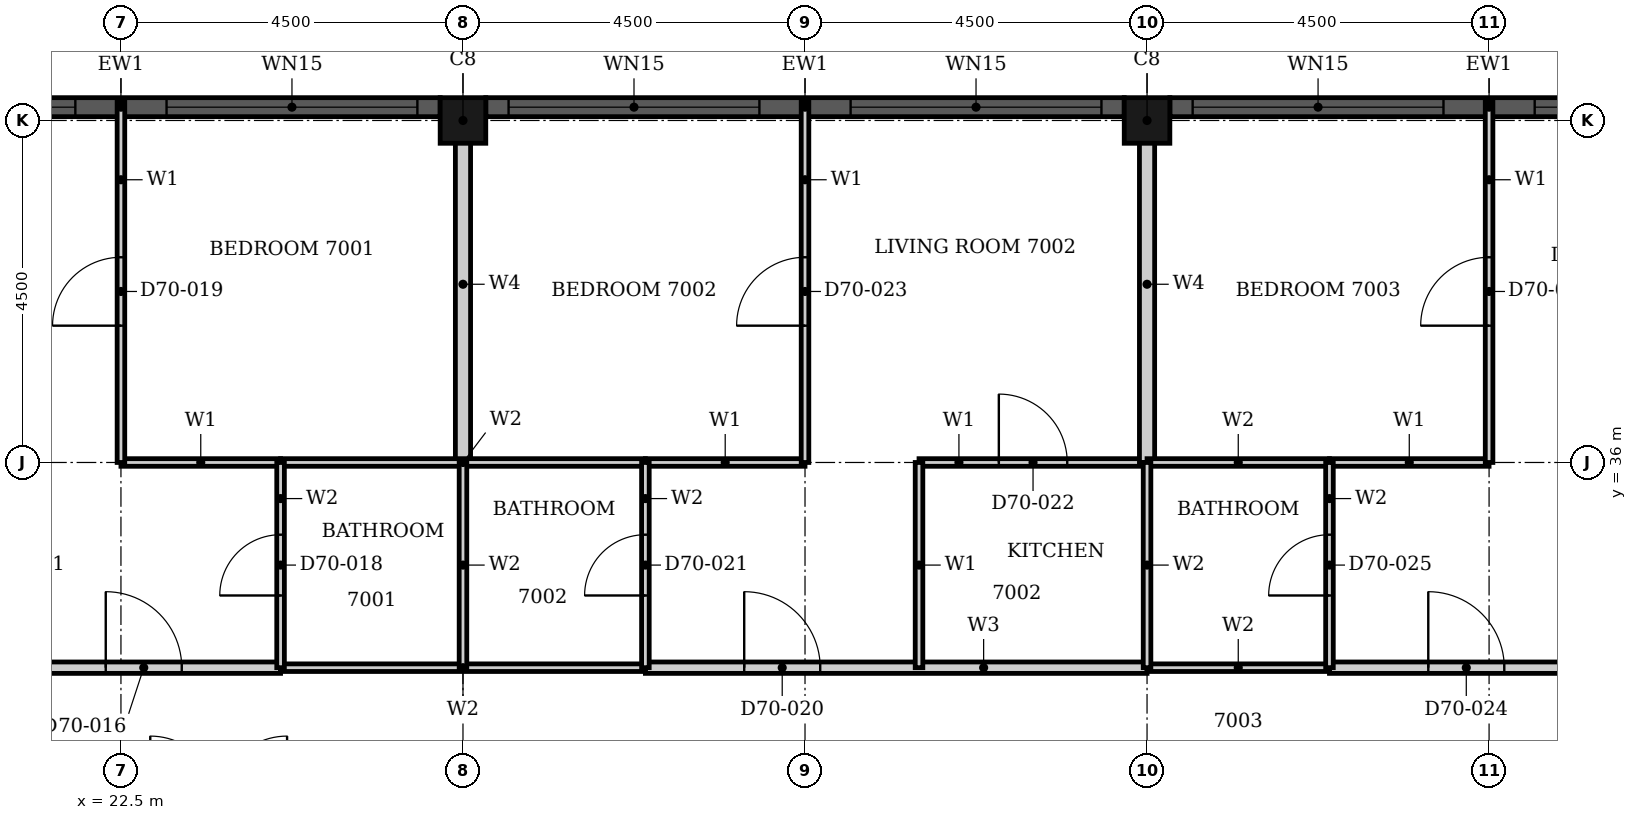
"""IFC4 building model, lengths in metres.
Left out: names, types, materials, properties, quantities, classifications, styles, units other than length and angle.
Written with IfcOpenShell. Run it as: python <this file> out.ifc"""

import sys

from ifc_helpers import new_model, si_unit, direction, frame, frame_2d, origin, origin_2d, place, context, subcontext, project, spatial, rectangle, hollow_rectangle, extrude, element, fill, save


model = new_model("IFC4")
c1 = context("Model", 3, precision=1e-05, world=origin(), true_north=direction((0.0, 1.0)))
c2 = subcontext(c1, "Body", "Model", "MODEL_VIEW")
j1 = project(units=[si_unit("LENGTHUNIT", "METRE"), si_unit("PLANEANGLEUNIT", "RADIAN")], contexts=[c1])
p1 = place(None, origin())
s1 = spatial("IfcSite", under=j1, at=p1, CompositionType="ELEMENT")
p2 = place(p1, origin())
s2 = spatial("IfcBuilding", under=s1, at=p2, CompositionType="ELEMENT")
p3 = place(p2, frame((0.0, 0.0, 274.9)))
s3 = spatial("IfcBuildingStorey", under=s2, at=p3, CompositionType="ELEMENT", Elevation=274.9)
for number, where, z_axis, x_axis in (
    (1, (36.0, 40.5, 0.0), (0.0, 0.0, 1.0), (1.0, 0.0, 0.0)),
    (2, (27.0, 40.5, 0.0), (0.0, 0.0, 1.0), (1.0, 0.0, 0.0)),
):
    element("IfcColumn", number, at=place(p3, frame(where, z_axis=z_axis, x_axis=x_axis)), inside=s3, PredefinedType="COLUMN", context=c2, shape_type="SweptSolid", body=[
        extrude(hollow_rectangle(XDim=0.6, YDim=0.6, WallThickness=0.02, at=origin_2d()), origin(), (0.0, 0.0, 1.0), 3.7),
    ])
p4 = place(p3, frame((44.7, 40.675, 0.0), z_axis=(0.0, 0.0, 1.0), x_axis=(-1.0, 0.0, 0.0)))
e3 = element("IfcWall", 3, at=p4, inside=s3, PredefinedType="SOLIDWALL", context=c2, shape_type="SweptSolid", body=[
    extrude(rectangle(XDim=8.4, YDim=0.25, at=frame_2d((4.2, 0.0))), origin(), (0.0, 0.0, 1.0), 3.7),
])
p5 = place(p4, frame((0.3, 0.0, 0.45)))
e4 = element("IfcOpeningElement", 4, at=p5, cuts=e3, PredefinedType="OPENING", context=c2, shape_type="SweptSolid", body=[
    extrude(rectangle(XDim=3.3, YDim=2.3, at=frame_2d((1.65, 1.15))), frame((0.0, 0.135, 0.0), z_axis=(0.0, -1.0, 0.0), x_axis=(1.0, 0.0, 0.0)), (0.0, 0.0, 1.0), 0.27),
])
p6 = place(p4, frame((4.8, 0.0, 0.45)))
e5 = element("IfcOpeningElement", 5, at=p6, cuts=e3, PredefinedType="OPENING", context=c2, shape_type="SweptSolid", body=[
    extrude(rectangle(XDim=3.3, YDim=2.3, at=frame_2d((1.65, 1.15))), frame((0.0, 0.135, 0.0), z_axis=(0.0, -1.0, 0.0), x_axis=(1.0, 0.0, 0.0)), (0.0, 0.0, 1.0), 0.27),
])
p7 = place(p3, frame((35.7, 40.675, 0.0), z_axis=(0.0, 0.0, 1.0), x_axis=(-1.0, 0.0, 0.0)))
e6 = element("IfcWall", 6, at=p7, inside=s3, PredefinedType="SOLIDWALL", context=c2, shape_type="SweptSolid", body=[
    extrude(rectangle(XDim=8.4, YDim=0.25, at=frame_2d((4.2, 0.0))), origin(), (0.0, 0.0, 1.0), 3.7),
])
p8 = place(p7, frame((0.3, 0.0, 0.45)))
e7 = element("IfcOpeningElement", 7, at=p8, cuts=e6, PredefinedType="OPENING", context=c2, shape_type="SweptSolid", body=[
    extrude(rectangle(XDim=3.3, YDim=2.3, at=frame_2d((1.65, 1.15))), frame((0.0, 0.135, 0.0), z_axis=(0.0, -1.0, 0.0), x_axis=(1.0, 0.0, 0.0)), (0.0, 0.0, 1.0), 0.27),
])
p9 = place(p7, frame((4.8, 0.0, 0.45)))
e8 = element("IfcOpeningElement", 8, at=p9, cuts=e6, PredefinedType="OPENING", context=c2, shape_type="SweptSolid", body=[
    extrude(rectangle(XDim=3.3, YDim=2.3, at=frame_2d((1.65, 1.15))), frame((0.0, 0.135, 0.0), z_axis=(0.0, -1.0, 0.0), x_axis=(1.0, 0.0, 0.0)), (0.0, 0.0, 1.0), 0.27),
])
p10 = place(p3, frame((26.7, 40.675, 0.0), z_axis=(0.0, 0.0, 1.0), x_axis=(-1.0, 0.0, 0.0)))
e9 = element("IfcWall", 9, at=p10, inside=s3, PredefinedType="SOLIDWALL", context=c2, shape_type="SweptSolid", body=[
    extrude(rectangle(XDim=8.4, YDim=0.25, at=frame_2d((4.2, 0.0))), origin(), (0.0, 0.0, 1.0), 3.7),
])
p11 = place(p10, frame((0.3, 0.0, 0.45)))
e10 = element("IfcOpeningElement", 10, at=p11, cuts=e9, PredefinedType="OPENING", context=c2, shape_type="SweptSolid", body=[
    extrude(rectangle(XDim=3.3, YDim=2.3, at=frame_2d((1.65, 1.15))), frame((0.0, 0.135, 0.0), z_axis=(0.0, -1.0, 0.0), x_axis=(1.0, 0.0, 0.0)), (0.0, 0.0, 1.0), 0.27),
])
p12 = place(p10, frame((4.8, 0.0, 0.45)))
e11 = element("IfcOpeningElement", 11, at=p12, cuts=e9, PredefinedType="OPENING", context=c2, shape_type="SweptSolid", body=[
    extrude(rectangle(XDim=3.3, YDim=2.3, at=frame_2d((1.65, 1.15))), frame((0.0, 0.135, 0.0), z_axis=(0.0, -1.0, 0.0), x_axis=(1.0, 0.0, 0.0)), (0.0, 0.0, 1.0), 0.27),
])
p13 = place(p3, frame((18.0, 33.3, 0.0), z_axis=(0.0, 0.0, 1.0), x_axis=(1.0, 0.0, 0.0)))
e12 = element("IfcWall", 12, at=p13, inside=s3, PredefinedType="PARTITIONING", context=c2, shape_type="SweptSolid", body=[
    extrude(rectangle(XDim=6.6, YDim=0.15, at=frame_2d((3.3, 0.0))), origin(), (0.0, 0.0, 1.0), 3.3),
])
p14 = place(p13, frame((4.3, 0.0, 0.0)))
e13 = element("IfcOpeningElement", 13, at=p14, cuts=e12, PredefinedType="OPENING", context=c2, shape_type="SweptSolid", body=[
    extrude(rectangle(XDim=1.0, YDim=2.2, at=frame_2d((0.5, 1.1))), frame((0.0, 0.085, 0.0), z_axis=(0.0, -1.0, 0.0), x_axis=(1.0, 0.0, 0.0)), (0.0, 0.0, 1.0), 0.17),
])
p15 = place(p3, frame((29.4, 33.3, 0.0), z_axis=(0.0, 0.0, 1.0), x_axis=(1.0, 0.0, 0.0)))
e14 = element("IfcWall", 14, at=p15, inside=s3, PredefinedType="PARTITIONING", context=c2, shape_type="SweptSolid", body=[
    extrude(rectangle(XDim=6.6, YDim=0.15, at=frame_2d((3.3, 0.0))), origin(), (0.0, 0.0, 1.0), 3.3),
])
p16 = place(p15, frame((1.3, 0.0, 0.0)))
e15 = element("IfcOpeningElement", 15, at=p16, cuts=e14, PredefinedType="OPENING", context=c2, shape_type="SweptSolid", body=[
    extrude(rectangle(XDim=1.0, YDim=2.2, at=frame_2d((0.5, 1.1))), frame((0.0, 0.085, 0.0), z_axis=(0.0, -1.0, 0.0), x_axis=(1.0, 0.0, 0.0)), (0.0, 0.0, 1.0), 0.17),
])
p17 = place(p3, frame((38.4, 33.3, 0.0), z_axis=(0.0, 0.0, 1.0), x_axis=(1.0, 0.0, 0.0)))
e16 = element("IfcWall", 16, at=p17, inside=s3, PredefinedType="PARTITIONING", context=c2, shape_type="SweptSolid", body=[
    extrude(rectangle(XDim=6.6, YDim=0.15, at=frame_2d((3.3, 0.0))), origin(), (0.0, 0.0, 1.0), 3.3),
])
p18 = place(p17, frame((1.3, 0.0, 0.0)))
e17 = element("IfcOpeningElement", 17, at=p18, cuts=e16, PredefinedType="OPENING", context=c2, shape_type="SweptSolid", body=[
    extrude(rectangle(XDim=1.0, YDim=2.2, at=frame_2d((0.5, 1.1))), frame((0.0, 0.085, 0.0), z_axis=(0.0, -1.0, 0.0), x_axis=(1.0, 0.0, 0.0)), (0.0, 0.0, 1.0), 0.17),
])
for number, where, z_axis, x_axis in (
    (18, (22.5, 36.0, 0.0), (0.0, 0.0, 1.0), (1.0, 0.0, 0.0)),
    (19, (29.4, 36.0, 0.0), (0.0, 0.0, 1.0), (1.0, 0.0, 0.0)),
):
    element("IfcWall", number, at=place(p3, frame(where, z_axis=z_axis, x_axis=x_axis)), inside=s3, PredefinedType="PARTITIONING", context=c2, shape_type="SweptSolid", body=[
        extrude(rectangle(XDim=2.1, YDim=0.1, at=frame_2d((1.05, 0.0))), origin(), (0.0, 0.0, 1.0), 3.3),
    ])
p19 = place(p3, frame((33.0, 36.0, 0.0), z_axis=(0.0, 0.0, 1.0), x_axis=(1.0, 0.0, 0.0)))
e20 = element("IfcWall", 20, at=p19, inside=s3, PredefinedType="PARTITIONING", context=c2, shape_type="SweptSolid", body=[
    extrude(rectangle(XDim=3.0, YDim=0.1, at=frame_2d((1.5, 0.0))), origin(), (0.0, 0.0, 1.0), 3.3),
])
p20 = place(p19, frame((1.05, 0.0, 0.0)))
e21 = element("IfcOpeningElement", 21, at=p20, cuts=e20, PredefinedType="OPENING", context=c2, shape_type="SweptSolid", body=[
    extrude(rectangle(XDim=0.9, YDim=2.1, at=frame_2d((0.45, 1.05))), frame((0.0, 0.06, 0.0), z_axis=(0.0, -1.0, 0.0), x_axis=(1.0, 0.0, 0.0)), (0.0, 0.0, 1.0), 0.12),
])
p21 = place(p3, frame((38.4, 36.0, 0.0), z_axis=(0.0, 0.0, 1.0), x_axis=(1.0, 0.0, 0.0)))
e22 = element("IfcWall", 22, at=p21, inside=s3, PredefinedType="PARTITIONING", context=c2, shape_type="SweptSolid", body=[
    extrude(rectangle(XDim=2.1, YDim=0.1, at=frame_2d((1.05, 0.0))), origin(), (0.0, 0.0, 1.0), 3.3),
])
p22 = place(p3, frame((22.5, 36.0, 0.0), z_axis=(0.0, 0.0, 1.0), x_axis=(0.0, 1.0, 0.0)))
e23 = element("IfcWall", 23, at=p22, inside=s3, PredefinedType="PARTITIONING", context=c2, shape_type="SweptSolid", body=[
    extrude(rectangle(XDim=4.74, YDim=0.1, at=frame_2d((2.37, 0.0))), origin(), (0.0, 0.0, 1.0), 3.3),
])
p23 = place(p22, frame((1.8, 0.0, 0.0)))
e24 = element("IfcOpeningElement", 24, at=p23, cuts=e23, PredefinedType="OPENING", context=c2, shape_type="SweptSolid", body=[
    extrude(rectangle(XDim=0.9, YDim=2.1, at=frame_2d((0.45, 1.05))), frame((0.0, 0.06, 0.0), z_axis=(0.0, -1.0, 0.0), x_axis=(1.0, 0.0, 0.0)), (0.0, 0.0, 1.0), 0.12),
])
p24 = place(p3, frame((31.5, 36.0, 0.0), z_axis=(0.0, 0.0, 1.0), x_axis=(0.0, 1.0, 0.0)))
e25 = element("IfcWall", 25, at=p24, inside=s3, PredefinedType="PARTITIONING", context=c2, shape_type="SweptSolid", body=[
    extrude(rectangle(XDim=4.74, YDim=0.1, at=frame_2d((2.37, 0.0))), origin(), (0.0, 0.0, 1.0), 3.3),
])
p25 = place(p24, frame((1.8, 0.0, 0.0)))
e26 = element("IfcOpeningElement", 26, at=p25, cuts=e25, PredefinedType="OPENING", context=c2, shape_type="SweptSolid", body=[
    extrude(rectangle(XDim=0.9, YDim=2.1, at=frame_2d((0.45, 1.05))), frame((0.0, 0.06, 0.0), z_axis=(0.0, -1.0, 0.0), x_axis=(1.0, 0.0, 0.0)), (0.0, 0.0, 1.0), 0.12),
])
p26 = place(p3, frame((33.0, 33.3, 0.0), z_axis=(0.0, 0.0, 1.0), x_axis=(0.0, 1.0, 0.0)))
e27 = element("IfcWall", 27, at=p26, inside=s3, PredefinedType="PARTITIONING", context=c2, shape_type="SweptSolid", body=[
    extrude(rectangle(XDim=2.7, YDim=0.1, at=frame_2d((1.35, 0.0))), origin(), (0.0, 0.0, 1.0), 3.3),
])
p27 = place(p3, frame((40.5, 36.0, 0.0), z_axis=(0.0, 0.0, 1.0), x_axis=(0.0, 1.0, 0.0)))
e28 = element("IfcWall", 28, at=p27, inside=s3, PredefinedType="PARTITIONING", context=c2, shape_type="SweptSolid", body=[
    extrude(rectangle(XDim=4.74, YDim=0.1, at=frame_2d((2.37, 0.0))), origin(), (0.0, 0.0, 1.0), 3.3),
])
p28 = place(p27, frame((1.8, 0.0, 0.0)))
e29 = element("IfcOpeningElement", 29, at=p28, cuts=e28, PredefinedType="OPENING", context=c2, shape_type="SweptSolid", body=[
    extrude(rectangle(XDim=0.9, YDim=2.1, at=frame_2d((0.45, 1.05))), frame((0.0, 0.06, 0.0), z_axis=(0.0, -1.0, 0.0), x_axis=(1.0, 0.0, 0.0)), (0.0, 0.0, 1.0), 0.12),
])
for number, where, z_axis, x_axis in (
    (30, (27.0, 36.0, 0.0), (0.0, 0.0, 1.0), (0.0, 1.0, 0.0)),
    (31, (36.0, 36.0, 0.0), (0.0, 0.0, 1.0), (0.0, 1.0, 0.0)),
):
    element("IfcWall", number, at=place(p3, frame(where, z_axis=z_axis, x_axis=x_axis)), inside=s3, PredefinedType="PARTITIONING", context=c2, shape_type="SweptSolid", body=[
        extrude(rectangle(XDim=4.69, YDim=0.2, at=frame_2d((2.345, 0.0))), origin(), (0.0, 0.0, 1.0), 3.3),
    ])
p29 = place(p3, frame((24.6, 33.3, 0.0), z_axis=(0.0, 0.0, 1.0), x_axis=(1.0, 0.0, 0.0)))
e32 = element("IfcWall", 32, at=p29, inside=s3, PredefinedType="PARTITIONING", context=c2, shape_type="SweptSolid", body=[
    extrude(rectangle(XDim=4.8, YDim=0.1, at=frame_2d((2.4, 0.0))), origin(), (0.0, 0.0, 1.0), 3.3),
])
p30 = place(p3, frame((36.0, 33.3, 0.0), z_axis=(0.0, 0.0, 1.0), x_axis=(1.0, 0.0, 0.0)))
e33 = element("IfcWall", 33, at=p30, inside=s3, PredefinedType="PARTITIONING", context=c2, shape_type="SweptSolid", body=[
    extrude(rectangle(XDim=2.4, YDim=0.1, at=frame_2d((1.2, 0.0))), origin(), (0.0, 0.0, 1.0), 3.3),
])
p31 = place(p3, frame((24.6, 36.0, 0.0), z_axis=(0.0, 0.0, 1.0), x_axis=(1.0, 0.0, 0.0)))
e34 = element("IfcWall", 34, at=p31, inside=s3, PredefinedType="PARTITIONING", context=c2, shape_type="SweptSolid", body=[
    extrude(rectangle(XDim=4.8, YDim=0.1, at=frame_2d((2.4, 0.0))), origin(), (0.0, 0.0, 1.0), 3.3),
])
p32 = place(p3, frame((36.0, 36.0, 0.0), z_axis=(0.0, 0.0, 1.0), x_axis=(1.0, 0.0, 0.0)))
e35 = element("IfcWall", 35, at=p32, inside=s3, PredefinedType="PARTITIONING", context=c2, shape_type="SweptSolid", body=[
    extrude(rectangle(XDim=2.4, YDim=0.1, at=frame_2d((1.2, 0.0))), origin(), (0.0, 0.0, 1.0), 3.3),
])
p33 = place(p3, frame((24.6, 33.3, 0.0), z_axis=(0.0, 0.0, 1.0), x_axis=(0.0, 1.0, 0.0)))
e36 = element("IfcWall", 36, at=p33, inside=s3, PredefinedType="PARTITIONING", context=c2, shape_type="SweptSolid", body=[
    extrude(rectangle(XDim=2.7, YDim=0.1, at=frame_2d((1.35, 0.0))), origin(), (0.0, 0.0, 1.0), 3.3),
])
p34 = place(p33, frame((0.95, 0.0, 0.0)))
e37 = element("IfcOpeningElement", 37, at=p34, cuts=e36, PredefinedType="OPENING", context=c2, shape_type="SweptSolid", body=[
    extrude(rectangle(XDim=0.8, YDim=2.1, at=frame_2d((0.4, 1.05))), frame((0.0, 0.06, 0.0), z_axis=(0.0, -1.0, 0.0), x_axis=(1.0, 0.0, 0.0)), (0.0, 0.0, 1.0), 0.12),
])
p35 = place(p3, frame((27.0, 33.3, 0.0), z_axis=(0.0, 0.0, 1.0), x_axis=(0.0, 1.0, 0.0)))
e38 = element("IfcWall", 38, at=p35, inside=s3, PredefinedType="PARTITIONING", context=c2, shape_type="SweptSolid", body=[
    extrude(rectangle(XDim=2.7, YDim=0.1, at=frame_2d((1.35, 0.0))), origin(), (0.0, 0.0, 1.0), 3.3),
])
p36 = place(p3, frame((29.4, 33.3, 0.0), z_axis=(0.0, 0.0, 1.0), x_axis=(0.0, 1.0, 0.0)))
e39 = element("IfcWall", 39, at=p36, inside=s3, PredefinedType="PARTITIONING", context=c2, shape_type="SweptSolid", body=[
    extrude(rectangle(XDim=2.7, YDim=0.1, at=frame_2d((1.35, 0.0))), origin(), (0.0, 0.0, 1.0), 3.3),
])
p37 = place(p36, frame((0.95, 0.0, 0.0)))
e40 = element("IfcOpeningElement", 40, at=p37, cuts=e39, PredefinedType="OPENING", context=c2, shape_type="SweptSolid", body=[
    extrude(rectangle(XDim=0.8, YDim=2.1, at=frame_2d((0.4, 1.05))), frame((0.0, 0.06, 0.0), z_axis=(0.0, -1.0, 0.0), x_axis=(1.0, 0.0, 0.0)), (0.0, 0.0, 1.0), 0.12),
])
p38 = place(p3, frame((36.0, 33.3, 0.0), z_axis=(0.0, 0.0, 1.0), x_axis=(0.0, 1.0, 0.0)))
e41 = element("IfcWall", 41, at=p38, inside=s3, PredefinedType="PARTITIONING", context=c2, shape_type="SweptSolid", body=[
    extrude(rectangle(XDim=2.7, YDim=0.1, at=frame_2d((1.35, 0.0))), origin(), (0.0, 0.0, 1.0), 3.3),
])
p39 = place(p3, frame((38.4, 33.3, 0.0), z_axis=(0.0, 0.0, 1.0), x_axis=(0.0, 1.0, 0.0)))
e42 = element("IfcWall", 42, at=p39, inside=s3, PredefinedType="PARTITIONING", context=c2, shape_type="SweptSolid", body=[
    extrude(rectangle(XDim=2.7, YDim=0.1, at=frame_2d((1.35, 0.0))), origin(), (0.0, 0.0, 1.0), 3.3),
])
p40 = place(p39, frame((0.95, 0.0, 0.0)))
e43 = element("IfcOpeningElement", 43, at=p40, cuts=e42, PredefinedType="OPENING", context=c2, shape_type="SweptSolid", body=[
    extrude(rectangle(XDim=0.8, YDim=2.1, at=frame_2d((0.4, 1.05))), frame((0.0, 0.06, 0.0), z_axis=(0.0, -1.0, 0.0), x_axis=(1.0, 0.0, 0.0)), (0.0, 0.0, 1.0), 0.12),
])
p41 = place(p5, origin())
e44 = element("IfcWindow", 44, at=p41, inside=s3, PartitioningType="SINGLE_PANEL", PredefinedType="WINDOW", context=c2, shape_type="SweptSolid", body=[
    extrude(rectangle(XDim=3.3, YDim=2.3, at=frame_2d((1.65, 1.15))), frame((0.0, 0.03, 0.0), z_axis=(0.0, -1.0, 0.0), x_axis=(1.0, 0.0, 0.0)), (0.0, 0.0, 1.0), 0.06),
])
fill(e4, e44)
p42 = place(p6, origin())
e45 = element("IfcWindow", 45, at=p42, inside=s3, PartitioningType="SINGLE_PANEL", PredefinedType="WINDOW", context=c2, shape_type="SweptSolid", body=[
    extrude(rectangle(XDim=3.3, YDim=2.3, at=frame_2d((1.65, 1.15))), frame((0.0, 0.03, 0.0), z_axis=(0.0, -1.0, 0.0), x_axis=(1.0, 0.0, 0.0)), (0.0, 0.0, 1.0), 0.06),
])
fill(e5, e45)
p43 = place(p8, origin())
e46 = element("IfcWindow", 46, at=p43, inside=s3, PartitioningType="SINGLE_PANEL", PredefinedType="WINDOW", context=c2, shape_type="SweptSolid", body=[
    extrude(rectangle(XDim=3.3, YDim=2.3, at=frame_2d((1.65, 1.15))), frame((0.0, 0.03, 0.0), z_axis=(0.0, -1.0, 0.0), x_axis=(1.0, 0.0, 0.0)), (0.0, 0.0, 1.0), 0.06),
])
fill(e7, e46)
p44 = place(p9, origin())
e47 = element("IfcWindow", 47, at=p44, inside=s3, PartitioningType="SINGLE_PANEL", PredefinedType="WINDOW", context=c2, shape_type="SweptSolid", body=[
    extrude(rectangle(XDim=3.3, YDim=2.3, at=frame_2d((1.65, 1.15))), frame((0.0, 0.03, 0.0), z_axis=(0.0, -1.0, 0.0), x_axis=(1.0, 0.0, 0.0)), (0.0, 0.0, 1.0), 0.06),
])
fill(e8, e47)
p45 = place(p11, origin())
e48 = element("IfcWindow", 48, at=p45, inside=s3, PartitioningType="SINGLE_PANEL", PredefinedType="WINDOW", context=c2, shape_type="SweptSolid", body=[
    extrude(rectangle(XDim=3.3, YDim=2.3, at=frame_2d((1.65, 1.15))), frame((0.0, 0.03, 0.0), z_axis=(0.0, -1.0, 0.0), x_axis=(1.0, 0.0, 0.0)), (0.0, 0.0, 1.0), 0.06),
])
fill(e10, e48)
p46 = place(p12, origin())
e49 = element("IfcWindow", 49, at=p46, inside=s3, PartitioningType="SINGLE_PANEL", PredefinedType="WINDOW", context=c2, shape_type="SweptSolid", body=[
    extrude(rectangle(XDim=3.3, YDim=2.3, at=frame_2d((1.65, 1.15))), frame((0.0, 0.03, 0.0), z_axis=(0.0, -1.0, 0.0), x_axis=(1.0, 0.0, 0.0)), (0.0, 0.0, 1.0), 0.06),
])
fill(e11, e49)
p47 = place(p14, origin())
e50 = element("IfcDoor", 50, at=p47, inside=s3, OperationType="SINGLE_SWING_LEFT", PredefinedType="DOOR", context=c2, shape_type="SweptSolid", body=[
    extrude(rectangle(XDim=1.0, YDim=2.2, at=frame_2d((0.5, 1.1))), frame((0.0, 0.025, 0.0), z_axis=(0.0, -1.0, 0.0), x_axis=(1.0, 0.0, 0.0)), (0.0, 0.0, 1.0), 0.05),
])
fill(e13, e50)
p48 = place(p34, origin())
e51 = element("IfcDoor", 51, at=p48, inside=s3, OperationType="SINGLE_SWING_LEFT", PredefinedType="DOOR", context=c2, shape_type="SweptSolid", body=[
    extrude(rectangle(XDim=0.8, YDim=2.1, at=frame_2d((0.4, 1.05))), frame((0.0, 0.025, 0.0), z_axis=(0.0, -1.0, 0.0), x_axis=(1.0, 0.0, 0.0)), (0.0, 0.0, 1.0), 0.05),
])
fill(e37, e51)
p49 = place(p23, origin())
e52 = element("IfcDoor", 52, at=p49, inside=s3, OperationType="SINGLE_SWING_RIGHT", PredefinedType="DOOR", context=c2, shape_type="SweptSolid", body=[
    extrude(rectangle(XDim=0.9, YDim=2.1, at=frame_2d((0.45, 1.05))), frame((0.0, 0.025, 0.0), z_axis=(0.0, -1.0, 0.0), x_axis=(1.0, 0.0, 0.0)), (0.0, 0.0, 1.0), 0.05),
])
fill(e24, e52)
p50 = place(p16, origin())
e53 = element("IfcDoor", 53, at=p50, inside=s3, OperationType="SINGLE_SWING_LEFT", PredefinedType="DOOR", context=c2, shape_type="SweptSolid", body=[
    extrude(rectangle(XDim=1.0, YDim=2.2, at=frame_2d((0.5, 1.1))), frame((0.0, 0.025, 0.0), z_axis=(0.0, -1.0, 0.0), x_axis=(1.0, 0.0, 0.0)), (0.0, 0.0, 1.0), 0.05),
])
fill(e15, e53)
p51 = place(p37, origin())
e54 = element("IfcDoor", 54, at=p51, inside=s3, OperationType="SINGLE_SWING_RIGHT", PredefinedType="DOOR", context=c2, shape_type="SweptSolid", body=[
    extrude(rectangle(XDim=0.8, YDim=2.1, at=frame_2d((0.4, 1.05))), frame((0.0, 0.025, 0.0), z_axis=(0.0, -1.0, 0.0), x_axis=(1.0, 0.0, 0.0)), (0.0, 0.0, 1.0), 0.05),
])
fill(e40, e54)
p52 = place(p20, origin())
e55 = element("IfcDoor", 55, at=p52, inside=s3, OperationType="SINGLE_SWING_LEFT", PredefinedType="DOOR", context=c2, shape_type="SweptSolid", body=[
    extrude(rectangle(XDim=0.9, YDim=2.1, at=frame_2d((0.45, 1.05))), frame((0.0, 0.025, 0.0), z_axis=(0.0, -1.0, 0.0), x_axis=(1.0, 0.0, 0.0)), (0.0, 0.0, 1.0), 0.05),
])
fill(e21, e55)
p53 = place(p25, origin())
e56 = element("IfcDoor", 56, at=p53, inside=s3, OperationType="SINGLE_SWING_LEFT", PredefinedType="DOOR", context=c2, shape_type="SweptSolid", body=[
    extrude(rectangle(XDim=0.9, YDim=2.1, at=frame_2d((0.45, 1.05))), frame((0.0, 0.025, 0.0), z_axis=(0.0, -1.0, 0.0), x_axis=(1.0, 0.0, 0.0)), (0.0, 0.0, 1.0), 0.05),
])
fill(e26, e56)
p54 = place(p18, origin())
e57 = element("IfcDoor", 57, at=p54, inside=s3, OperationType="SINGLE_SWING_LEFT", PredefinedType="DOOR", context=c2, shape_type="SweptSolid", body=[
    extrude(rectangle(XDim=1.0, YDim=2.2, at=frame_2d((0.5, 1.1))), frame((0.0, 0.025, 0.0), z_axis=(0.0, -1.0, 0.0), x_axis=(1.0, 0.0, 0.0)), (0.0, 0.0, 1.0), 0.05),
])
fill(e17, e57)
p55 = place(p40, origin())
e58 = element("IfcDoor", 58, at=p55, inside=s3, OperationType="SINGLE_SWING_RIGHT", PredefinedType="DOOR", context=c2, shape_type="SweptSolid", body=[
    extrude(rectangle(XDim=0.8, YDim=2.1, at=frame_2d((0.4, 1.05))), frame((0.0, 0.025, 0.0), z_axis=(0.0, -1.0, 0.0), x_axis=(1.0, 0.0, 0.0)), (0.0, 0.0, 1.0), 0.05),
])
fill(e43, e58)
p56 = place(p28, origin())
e59 = element("IfcDoor", 59, at=p56, inside=s3, OperationType="SINGLE_SWING_LEFT", PredefinedType="DOOR", context=c2, shape_type="SweptSolid", body=[
    extrude(rectangle(XDim=0.9, YDim=2.1, at=frame_2d((0.45, 1.05))), frame((0.0, 0.025, 0.0), z_axis=(0.0, -1.0, 0.0), x_axis=(1.0, 0.0, 0.0)), (0.0, 0.0, 1.0), 0.05),
])
fill(e29, e59)
save(model, sys.argv[1])
